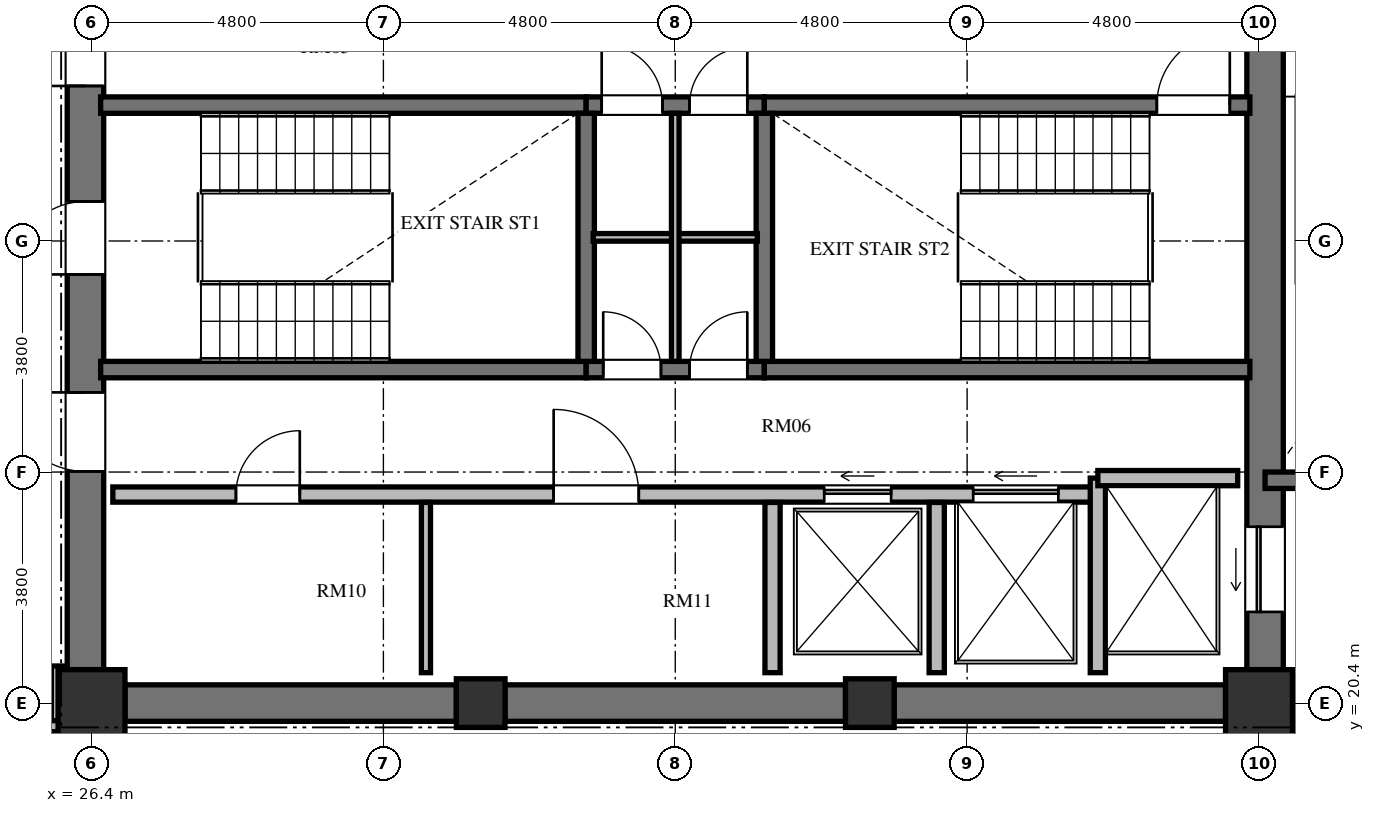
"""IFC4 building model, lengths in metres.
Left out: names, types, materials, properties, quantities, classifications, styles, units other than length and angle.
Written with IfcOpenShell. Run it as: python <this file> out.ifc"""

import sys

from ifc_helpers import new_model, si_unit, direction, frame, frame_2d, origin, origin_2d, place, context, subcontext, project, spatial, rectangle, extrude, element, fill, save


model = new_model("IFC4")
c1 = context("Model", 3, precision=1e-05, world=origin(), true_north=direction((0.0, 1.0)))
c2 = subcontext(c1, "Body", "Model", "MODEL_VIEW")
j1 = project(units=[si_unit("LENGTHUNIT", "METRE"), si_unit("PLANEANGLEUNIT", "RADIAN")], contexts=[c1])
p1 = place(None, origin())
s1 = spatial("IfcSite", under=j1, at=p1, CompositionType="ELEMENT")
p2 = place(p1, origin())
s2 = spatial("IfcBuilding", under=s1, at=p2, CompositionType="ELEMENT")
p3 = place(p2, frame((0.0, 0.0, 213.072)))
s3 = spatial("IfcBuildingStorey", under=s2, at=p3, CompositionType="ELEMENT", Elevation=213.072)
p4 = place(p3, frame((26.4, 20.4, 0.0), z_axis=(0.0, 0.0, 1.0), x_axis=(1.0, 0.0, 0.0)))
e1 = element("IfcColumn", 1, at=p4, inside=s3, PredefinedType="COLUMN", context=c2, shape_type="SweptSolid", body=[
    extrude(rectangle(XDim=1.1, YDim=1.1, at=origin_2d()), origin(), (0.0, 0.0, 1.0), 3.648),
])
for number, where, z_axis, x_axis in (
    (2, (32.8, 20.4, 0.0), (0.0, 0.0, 1.0), (1.0, 0.0, 0.0)),
    (3, (39.2, 20.4, 0.0), (0.0, 0.0, 1.0), (1.0, 0.0, 0.0)),
):
    element("IfcColumn", number, at=place(p3, frame(where, z_axis=z_axis, x_axis=x_axis)), inside=s3, PredefinedType="COLUMN", context=c2, shape_type="SweptSolid", body=[
        extrude(rectangle(XDim=0.8, YDim=0.8, at=origin_2d()), origin(), (0.0, 0.0, 1.0), 3.648),
    ])
p5 = place(p3, frame((45.6, 20.4, 0.0), z_axis=(0.0, 0.0, 1.0), x_axis=(1.0, 0.0, 0.0)))
e4 = element("IfcColumn", 4, at=p5, inside=s3, PredefinedType="COLUMN", context=c2, shape_type="SweptSolid", body=[
    extrude(rectangle(XDim=1.1, YDim=1.1, at=origin_2d()), origin(), (0.0, 0.0, 1.0), 3.648),
])
p6 = place(p3, frame((26.3, 20.95, 0.0), z_axis=(0.0, 0.0, 1.0), x_axis=(0.0, 1.0, 0.0)))
e5 = element("IfcWall", 5, at=p6, inside=s3, PredefinedType="SHEAR", context=c2, shape_type="SweptSolid", body=[
    extrude(rectangle(XDim=14.1, YDim=0.6, at=frame_2d((7.05, 0.0))), origin(), (0.0, 0.0, 1.0), 3.648),
])
p7 = place(p6, frame((6.5, 0.0, 0.0)))
e6 = element("IfcOpeningElement", 6, at=p7, cuts=e5, PredefinedType="OPENING", context=c2, shape_type="SweptSolid", body=[
    extrude(rectangle(XDim=1.2, YDim=2.15, at=frame_2d((0.6, 1.075))), frame((0.0, 0.31, 0.0), z_axis=(0.0, -1.0, 0.0), x_axis=(1.0, 0.0, 0.0)), (0.0, 0.0, 1.0), 0.62),
])
p8 = place(p6, frame((9.6, 0.0, 0.0)))
e7 = element("IfcOpeningElement", 7, at=p8, cuts=e5, PredefinedType="OPENING", context=c2, shape_type="SweptSolid", body=[
    extrude(rectangle(XDim=1.3, YDim=2.2, at=frame_2d((0.65, 1.1))), frame((0.0, 0.31, 0.0), z_axis=(0.0, -1.0, 0.0), x_axis=(1.0, 0.0, 0.0)), (0.0, 0.0, 1.0), 0.62),
])
p9 = place(p6, frame((3.26, 0.0, 0.0)))
e8 = element("IfcOpeningElement", 8, at=p9, cuts=e5, PredefinedType="OPENING", context=c2, shape_type="SweptSolid", body=[
    extrude(rectangle(XDim=1.3, YDim=2.2, at=frame_2d((0.65, 1.1))), frame((0.0, 0.31, 0.0), z_axis=(0.0, -1.0, 0.0), x_axis=(1.0, 0.0, 0.0)), (0.0, 0.0, 1.0), 0.62),
])
p10 = place(p3, frame((45.7, 20.95, 0.0), z_axis=(0.0, 0.0, 1.0), x_axis=(0.0, 1.0, 0.0)))
e9 = element("IfcWall", 9, at=p10, inside=s3, PredefinedType="SHEAR", context=c2, shape_type="SweptSolid", body=[
    extrude(rectangle(XDim=14.1, YDim=0.6, at=frame_2d((7.05, 0.0))), origin(), (0.0, 0.0, 1.0), 3.648),
])
p11 = place(p10, frame((11.75, 0.0, 0.0)))
e10 = element("IfcOpeningElement", 10, at=p11, cuts=e9, PredefinedType="OPENING", context=c2, shape_type="SweptSolid", body=[
    extrude(rectangle(XDim=1.4, YDim=2.3, at=frame_2d((0.7, 1.15))), frame((0.0, 0.31, 0.0), z_axis=(0.0, -1.0, 0.0), x_axis=(1.0, 0.0, 0.0)), (0.0, 0.0, 1.0), 0.62),
])
p12 = place(p10, frame((0.95, 0.0, 0.0)))
e11 = element("IfcOpeningElement", 11, at=p12, cuts=e9, PredefinedType="OPENING", context=c2, shape_type="SweptSolid", body=[
    extrude(rectangle(XDim=1.4, YDim=2.3, at=frame_2d((0.7, 1.15))), frame((0.0, 0.31, 0.0), z_axis=(0.0, -1.0, 0.0), x_axis=(1.0, 0.0, 0.0)), (0.0, 0.0, 1.0), 0.62),
])
p13 = place(p3, frame((26.95, 20.4, 0.0), z_axis=(0.0, 0.0, 1.0), x_axis=(1.0, 0.0, 0.0)))
e12 = element("IfcWall", 12, at=p13, inside=s3, PredefinedType="SHEAR", context=c2, shape_type="SweptSolid", body=[
    extrude(rectangle(XDim=5.45, YDim=0.6, at=frame_2d((2.725, 0.0))), origin(), (0.0, 0.0, 1.0), 3.648),
])
p14 = place(p3, frame((33.2, 20.4, 0.0), z_axis=(0.0, 0.0, 1.0), x_axis=(1.0, 0.0, 0.0)))
e13 = element("IfcWall", 13, at=p14, inside=s3, PredefinedType="SHEAR", context=c2, shape_type="SweptSolid", body=[
    extrude(rectangle(XDim=5.6, YDim=0.6, at=frame_2d((2.8, 0.0))), origin(), (0.0, 0.0, 1.0), 3.648),
])
p15 = place(p3, frame((39.6, 20.4, 0.0), z_axis=(0.0, 0.0, 1.0), x_axis=(1.0, 0.0, 0.0)))
e14 = element("IfcWall", 14, at=p15, inside=s3, PredefinedType="SHEAR", context=c2, shape_type="SweptSolid", body=[
    extrude(rectangle(XDim=5.45, YDim=0.6, at=frame_2d((2.725, 0.0))), origin(), (0.0, 0.0, 1.0), 3.648),
])
p16 = place(p3, frame((26.55, 30.235, 0.0), z_axis=(0.0, 0.0, 1.0), x_axis=(1.0, 0.0, 0.0)))
e15 = element("IfcWall", 15, at=p16, inside=s3, PredefinedType="SHEAR", context=c2, shape_type="SweptSolid", body=[
    extrude(rectangle(XDim=7.985, YDim=0.27, at=frame_2d((3.992, 0.0))), origin(), (0.0, 0.0, 1.0), 3.648),
])
p17 = place(p3, frame((34.535, 30.235, 0.0), z_axis=(0.0, 0.0, 1.0), x_axis=(1.0, 0.0, 0.0)))
e16 = element("IfcWall", 16, at=p17, inside=s3, PredefinedType="SHEAR", context=c2, shape_type="SweptSolid", body=[
    extrude(rectangle(XDim=2.93, YDim=0.27, at=frame_2d((1.465, 0.0))), origin(), (0.0, 0.0, 1.0), 3.648),
])
p18 = place(p17, frame((0.255, 0.0, 0.0)))
e17 = element("IfcOpeningElement", 17, at=p18, cuts=e16, PredefinedType="OPENING", context=c2, shape_type="SweptSolid", body=[
    extrude(rectangle(XDim=1.0, YDim=2.1, at=frame_2d((0.5, 1.05))), frame((0.0, 0.145, 0.0), z_axis=(0.0, -1.0, 0.0), x_axis=(1.0, 0.0, 0.0)), (0.0, 0.0, 1.0), 0.29),
])
p19 = place(p17, frame((1.7, 0.0, 0.0)))
e18 = element("IfcOpeningElement", 18, at=p19, cuts=e16, PredefinedType="OPENING", context=c2, shape_type="SweptSolid", body=[
    extrude(rectangle(XDim=0.95, YDim=2.1, at=frame_2d((0.475, 1.05))), frame((0.0, 0.145, 0.0), z_axis=(0.0, -1.0, 0.0), x_axis=(1.0, 0.0, 0.0)), (0.0, 0.0, 1.0), 0.29),
])
p20 = place(p3, frame((37.465, 30.235, 0.0), z_axis=(0.0, 0.0, 1.0), x_axis=(1.0, 0.0, 0.0)))
e19 = element("IfcWall", 19, at=p20, inside=s3, PredefinedType="SHEAR", context=c2, shape_type="SweptSolid", body=[
    extrude(rectangle(XDim=7.985, YDim=0.27, at=frame_2d((3.992, 0.0))), origin(), (0.0, 0.0, 1.0), 3.648),
])
p21 = place(p20, frame((6.455, 0.0, 0.0)))
e20 = element("IfcOpeningElement", 20, at=p21, cuts=e19, PredefinedType="OPENING", context=c2, shape_type="SweptSolid", body=[
    extrude(rectangle(XDim=1.2, YDim=2.15, at=frame_2d((0.6, 1.075))), frame((0.0, 0.145, 0.0), z_axis=(0.0, -1.0, 0.0), x_axis=(1.0, 0.0, 0.0)), (0.0, 0.0, 1.0), 0.29),
])
p22 = place(p3, frame((26.55, 25.885, 0.0), z_axis=(0.0, 0.0, 1.0), x_axis=(1.0, 0.0, 0.0)))
e21 = element("IfcWall", 21, at=p22, inside=s3, PredefinedType="SHEAR", context=c2, shape_type="SweptSolid", body=[
    extrude(rectangle(XDim=7.985, YDim=0.27, at=frame_2d((3.992, 0.0))), origin(), (0.0, 0.0, 1.0), 3.648),
])
p23 = place(p3, frame((34.535, 25.885, 0.0), z_axis=(0.0, 0.0, 1.0), x_axis=(1.0, 0.0, 0.0)))
e22 = element("IfcWall", 22, at=p23, inside=s3, PredefinedType="SHEAR", context=c2, shape_type="SweptSolid", body=[
    extrude(rectangle(XDim=2.93, YDim=0.27, at=frame_2d((1.465, 0.0))), origin(), (0.0, 0.0, 1.0), 3.648),
])
p24 = place(p23, frame((0.28, 0.0, 0.0)))
e23 = element("IfcOpeningElement", 23, at=p24, cuts=e22, PredefinedType="OPENING", context=c2, shape_type="SweptSolid", body=[
    extrude(rectangle(XDim=0.95, YDim=2.1, at=frame_2d((0.475, 1.05))), frame((0.0, 0.145, 0.0), z_axis=(0.0, -1.0, 0.0), x_axis=(1.0, 0.0, 0.0)), (0.0, 0.0, 1.0), 0.29),
])
p25 = place(p23, frame((1.7, 0.0, 0.0)))
e24 = element("IfcOpeningElement", 24, at=p25, cuts=e22, PredefinedType="OPENING", context=c2, shape_type="SweptSolid", body=[
    extrude(rectangle(XDim=0.95, YDim=2.1, at=frame_2d((0.475, 1.05))), frame((0.0, 0.145, 0.0), z_axis=(0.0, -1.0, 0.0), x_axis=(1.0, 0.0, 0.0)), (0.0, 0.0, 1.0), 0.29),
])
p26 = place(p3, frame((37.465, 25.885, 0.0), z_axis=(0.0, 0.0, 1.0), x_axis=(1.0, 0.0, 0.0)))
e25 = element("IfcWall", 25, at=p26, inside=s3, PredefinedType="SHEAR", context=c2, shape_type="SweptSolid", body=[
    extrude(rectangle(XDim=7.985, YDim=0.27, at=frame_2d((3.992, 0.0))), origin(), (0.0, 0.0, 1.0), 3.648),
])
for number, where, z_axis, x_axis in (
    (26, (34.535, 26.02, 0.0), (0.0, 0.0, 1.0), (0.0, 1.0, 0.0)),
    (27, (37.465, 26.02, 0.0), (0.0, 0.0, 1.0), (0.0, 1.0, 0.0)),
):
    element("IfcWall", number, at=place(p3, frame(where, z_axis=z_axis, x_axis=x_axis)), inside=s3, PredefinedType="SHEAR", context=c2, shape_type="SweptSolid", body=[
        extrude(rectangle(XDim=4.08, YDim=0.27, at=frame_2d((2.04, 0.0))), origin(), (0.0, 0.0, 1.0), 3.648),
    ])
p27 = place(p3, frame((34.65, 28.06, 0.0), z_axis=(0.0, 0.0, 1.0), x_axis=(1.0, 0.0, 0.0)))
e28 = element("IfcWall", 28, at=p27, inside=s3, PredefinedType="PARTITIONING", context=c2, shape_type="SweptSolid", body=[
    extrude(rectangle(XDim=2.7, YDim=0.125, at=frame_2d((1.35, 0.0))), origin(), (0.0, 0.0, 1.0), 3.448),
])
p28 = place(p3, frame((36.0, 26.02, 0.0), z_axis=(0.0, 0.0, 1.0), x_axis=(0.0, 1.0, 0.0)))
e29 = element("IfcWall", 29, at=p28, inside=s3, PredefinedType="PARTITIONING", context=c2, shape_type="SweptSolid", body=[
    extrude(rectangle(XDim=4.08, YDim=0.125, at=frame_2d((2.04, 0.0))), origin(), (0.0, 0.0, 1.0), 3.448),
])
p29 = place(p3, frame((26.75, 23.83, 0.0), z_axis=(0.0, 0.0, 1.0), x_axis=(1.0, 0.0, 0.0)))
e30 = element("IfcWall", 30, at=p29, inside=s3, PredefinedType="SOLIDWALL", context=c2, shape_type="SweptSolid", body=[
    extrude(rectangle(XDim=16.2, YDim=0.25, at=frame_2d((8.1, 0.0))), origin(), (0.0, 0.0, 1.0), 3.448),
])
p30 = place(p29, frame((2.025, 0.0, 0.0)))
e31 = element("IfcOpeningElement", 31, at=p30, cuts=e30, PredefinedType="OPENING", context=c2, shape_type="SweptSolid", body=[
    extrude(rectangle(XDim=1.05, YDim=2.15, at=frame_2d((0.525, 1.075))), frame((0.0, 0.135, 0.0), z_axis=(0.0, -1.0, 0.0), x_axis=(1.0, 0.0, 0.0)), (0.0, 0.0, 1.0), 0.27),
])
p31 = place(p29, frame((7.25, 0.0, 0.0)))
e32 = element("IfcOpeningElement", 32, at=p31, cuts=e30, PredefinedType="OPENING", context=c2, shape_type="SweptSolid", body=[
    extrude(rectangle(XDim=1.4, YDim=2.2, at=frame_2d((0.7, 1.1))), frame((0.0, 0.135, 0.0), z_axis=(0.0, -1.0, 0.0), x_axis=(1.0, 0.0, 0.0)), (0.0, 0.0, 1.0), 0.27),
])
p32 = place(p29, frame((11.7, 0.0, 0.0)))
e33 = element("IfcOpeningElement", 33, at=p32, cuts=e30, PredefinedType="OPENING", context=c2, shape_type="SweptSolid", body=[
    extrude(rectangle(XDim=1.1, YDim=2.2, at=frame_2d((0.55, 1.1))), frame((0.0, 0.135, 0.0), z_axis=(0.0, -1.0, 0.0), x_axis=(1.0, 0.0, 0.0)), (0.0, 0.0, 1.0), 0.27),
])
p33 = place(p29, frame((14.15, 0.0, 0.0)))
e34 = element("IfcOpeningElement", 34, at=p33, cuts=e30, PredefinedType="OPENING", context=c2, shape_type="SweptSolid", body=[
    extrude(rectangle(XDim=1.4, YDim=2.3, at=frame_2d((0.7, 1.15))), frame((0.0, 0.135, 0.0), z_axis=(0.0, -1.0, 0.0), x_axis=(1.0, 0.0, 0.0)), (0.0, 0.0, 1.0), 0.27),
])
p34 = place(p3, frame((42.95, 20.9, 0.0), z_axis=(0.0, 0.0, 1.0), x_axis=(0.0, 1.0, 0.0)))
e35 = element("IfcWall", 35, at=p34, inside=s3, PredefinedType="SOLIDWALL", context=c2, shape_type="SweptSolid", body=[
    extrude(rectangle(XDim=3.2, YDim=0.25, at=frame_2d((1.6, 0.0))), origin(), (0.0, 0.0, 1.0), 3.448),
])
p35 = place(p3, frame((42.95, 24.1, 0.0), z_axis=(0.0, 0.0, 1.0), x_axis=(1.0, 0.0, 0.0)))
e36 = element("IfcWall", 36, at=p35, inside=s3, PredefinedType="SOLIDWALL", context=c2, shape_type="SweptSolid", body=[
    extrude(rectangle(XDim=2.3, YDim=0.25, at=frame_2d((1.15, 0.0))), origin(), (0.0, 0.0, 1.0), 3.448),
])
for number, where, z_axis, x_axis in (
    (37, (37.6, 20.9, 0.0), (0.0, 0.0, 1.0), (0.0, 1.0, 0.0)),
    (38, (40.3, 20.9, 0.0), (0.0, 0.0, 1.0), (0.0, 1.0, 0.0)),
):
    element("IfcWall", number, at=place(p3, frame(where, z_axis=z_axis, x_axis=x_axis)), inside=s3, PredefinedType="SOLIDWALL", context=c2, shape_type="SweptSolid", body=[
        extrude(rectangle(XDim=2.8, YDim=0.25, at=frame_2d((1.4, 0.0))), origin(), (0.0, 0.0, 1.0), 3.448),
    ])
p36 = place(p3, frame((31.9, 20.9, 0.0), z_axis=(0.0, 0.0, 1.0), x_axis=(0.0, 1.0, 0.0)))
e39 = element("IfcWall", 39, at=p36, inside=s3, PredefinedType="PARTITIONING", context=c2, shape_type="SweptSolid", body=[
    extrude(rectangle(XDim=2.8, YDim=0.15, at=frame_2d((1.4, 0.0))), origin(), (0.0, 0.0, 1.0), 3.448),
])
p37 = place(p3, frame((45.7, 24.065, 0.0), z_axis=(0.0, 0.0, 1.0), x_axis=(1.0, 0.0, 0.0)))
e40 = element("IfcWall", 40, at=p37, inside=s3, PredefinedType="SHEAR", context=c2, shape_type="SweptSolid", body=[
    extrude(rectangle(XDim=4.715, YDim=0.27, at=frame_2d((2.357, 0.0))), origin(), (0.0, 0.0, 1.0), 3.648),
])
p38 = place(p3, frame((45.7, 20.02, 0.0), z_axis=(0.0, 0.0, 1.0), x_axis=(1.0, 0.0, 0.0)))
e41 = element("IfcWall", 41, at=p38, inside=s3, PredefinedType="SOLIDWALL", context=c2, shape_type="SweptSolid", body=[
    extrude(rectangle(XDim=4.715, YDim=0.25, at=frame_2d((2.357, 0.0))), origin(), (0.0, 0.0, 1.0), 3.448),
])
p39 = place(p3, frame((25.83, 21.01, 0.0), z_axis=(0.0, 0.0, 1.0), x_axis=(0.0, -1.0, 0.0)))
e42 = element("IfcWall", 42, at=p39, inside=s3, PredefinedType="PARTITIONING", context=c2, shape_type="SweptSolid", body=[
    extrude(rectangle(XDim=1.03, YDim=0.18, at=frame_2d((0.515, 0.0))), origin(), (0.0, 0.0, 1.0), 3.448),
])
p40 = place(p3, frame((25.87, 20.02, 0.0), z_axis=(0.0, 0.0, 1.0), x_axis=(-1.0, 0.0, 0.0)))
e43 = element("IfcWall", 43, at=p40, inside=s3, PredefinedType="PARTITIONING", context=c2, shape_type="SweptSolid", body=[
    extrude(rectangle(XDim=2.56, YDim=0.18, at=frame_2d((1.28, 0.0))), origin(), (0.0, 0.0, 1.0), 3.448),
])
p41 = place(p7, origin())
e44 = element("IfcDoor", 44, at=p41, inside=s3, OperationType="SINGLE_SWING_LEFT", PredefinedType="DOOR", context=c2, shape_type="SweptSolid", body=[
    extrude(rectangle(XDim=1.2, YDim=2.15, at=frame_2d((0.6, 1.075))), frame((0.0, 0.025, 0.0), z_axis=(0.0, -1.0, 0.0), x_axis=(1.0, 0.0, 0.0)), (0.0, 0.0, 1.0), 0.05),
])
fill(e6, e44)
p42 = place(p21, origin())
e45 = element("IfcDoor", 45, at=p42, inside=s3, OperationType="SINGLE_SWING_RIGHT", PredefinedType="DOOR", context=c2, shape_type="SweptSolid", body=[
    extrude(rectangle(XDim=1.2, YDim=2.15, at=frame_2d((0.6, 1.075))), frame((0.0, 0.025, 0.0), z_axis=(0.0, -1.0, 0.0), x_axis=(1.0, 0.0, 0.0)), (0.0, 0.0, 1.0), 0.05),
])
fill(e20, e45)
p43 = place(p24, origin())
e46 = element("IfcDoor", 46, at=p43, inside=s3, OperationType="SINGLE_SWING_LEFT", PredefinedType="DOOR", context=c2, shape_type="SweptSolid", body=[
    extrude(rectangle(XDim=0.95, YDim=2.1, at=frame_2d((0.475, 1.05))), frame((0.0, 0.025, 0.0), z_axis=(0.0, -1.0, 0.0), x_axis=(1.0, 0.0, 0.0)), (0.0, 0.0, 1.0), 0.05),
])
fill(e23, e46)
p44 = place(p25, origin())
e47 = element("IfcDoor", 47, at=p44, inside=s3, OperationType="SINGLE_SWING_RIGHT", PredefinedType="DOOR", context=c2, shape_type="SweptSolid", body=[
    extrude(rectangle(XDim=0.95, YDim=2.1, at=frame_2d((0.475, 1.05))), frame((0.0, 0.025, 0.0), z_axis=(0.0, -1.0, 0.0), x_axis=(1.0, 0.0, 0.0)), (0.0, 0.0, 1.0), 0.05),
])
fill(e24, e47)
p45 = place(p18, origin())
e48 = element("IfcDoor", 48, at=p45, inside=s3, OperationType="SINGLE_SWING_LEFT", PredefinedType="DOOR", context=c2, shape_type="SweptSolid", body=[
    extrude(rectangle(XDim=1.0, YDim=2.1, at=frame_2d((0.5, 1.05))), frame((0.0, 0.025, 0.0), z_axis=(0.0, -1.0, 0.0), x_axis=(1.0, 0.0, 0.0)), (0.0, 0.0, 1.0), 0.05),
])
fill(e17, e48)
p46 = place(p19, origin())
e49 = element("IfcDoor", 49, at=p46, inside=s3, OperationType="SINGLE_SWING_RIGHT", PredefinedType="DOOR", context=c2, shape_type="SweptSolid", body=[
    extrude(rectangle(XDim=0.95, YDim=2.1, at=frame_2d((0.475, 1.05))), frame((0.0, 0.025, 0.0), z_axis=(0.0, -1.0, 0.0), x_axis=(1.0, 0.0, 0.0)), (0.0, 0.0, 1.0), 0.05),
])
fill(e18, e49)
p47 = place(p8, origin())
e50 = element("IfcDoor", 50, at=p47, inside=s3, OperationType="SINGLE_SWING_LEFT", PredefinedType="DOOR", context=c2, shape_type="SweptSolid", body=[
    extrude(rectangle(XDim=1.3, YDim=2.2, at=frame_2d((0.65, 1.1))), frame((0.0, 0.025, 0.0), z_axis=(0.0, -1.0, 0.0), x_axis=(1.0, 0.0, 0.0)), (0.0, 0.0, 1.0), 0.05),
])
fill(e7, e50)
p48 = place(p9, origin())
e51 = element("IfcDoor", 51, at=p48, inside=s3, OperationType="SINGLE_SWING_RIGHT", PredefinedType="DOOR", context=c2, shape_type="SweptSolid", body=[
    extrude(rectangle(XDim=1.3, YDim=2.2, at=frame_2d((0.65, 1.1))), frame((0.0, 0.025, 0.0), z_axis=(0.0, -1.0, 0.0), x_axis=(1.0, 0.0, 0.0)), (0.0, 0.0, 1.0), 0.05),
])
fill(e8, e51)
p49 = place(p30, origin())
e52 = element("IfcDoor", 52, at=p49, inside=s3, OperationType="SINGLE_SWING_RIGHT", PredefinedType="DOOR", context=c2, shape_type="SweptSolid", body=[
    extrude(rectangle(XDim=1.05, YDim=2.15, at=frame_2d((0.525, 1.075))), frame((0.0, 0.025, 0.0), z_axis=(0.0, -1.0, 0.0), x_axis=(1.0, 0.0, 0.0)), (0.0, 0.0, 1.0), 0.05),
])
fill(e31, e52)
p50 = place(p31, origin())
e53 = element("IfcDoor", 53, at=p50, inside=s3, OperationType="SINGLE_SWING_LEFT", PredefinedType="DOOR", context=c2, shape_type="SweptSolid", body=[
    extrude(rectangle(XDim=1.4, YDim=2.2, at=frame_2d((0.7, 1.1))), frame((0.0, 0.025, 0.0), z_axis=(0.0, -1.0, 0.0), x_axis=(1.0, 0.0, 0.0)), (0.0, 0.0, 1.0), 0.05),
])
fill(e32, e53)
p51 = place(p32, origin())
e54 = element("IfcDoor", 54, at=p51, inside=s3, OperationType="SLIDING_TO_LEFT", PredefinedType="DOOR", context=c2, shape_type="SweptSolid", body=[
    extrude(rectangle(XDim=1.1, YDim=2.2, at=frame_2d((0.55, 1.1))), frame((0.0, 0.025, 0.0), z_axis=(0.0, -1.0, 0.0), x_axis=(1.0, 0.0, 0.0)), (0.0, 0.0, 1.0), 0.05),
])
fill(e33, e54)
p52 = place(p12, origin())
e55 = element("IfcDoor", 55, at=p52, inside=s3, OperationType="SLIDING_TO_LEFT", PredefinedType="DOOR", context=c2, shape_type="SweptSolid", body=[
    extrude(rectangle(XDim=1.4, YDim=2.3, at=frame_2d((0.7, 1.15))), frame((0.0, 0.025, 0.0), z_axis=(0.0, -1.0, 0.0), x_axis=(1.0, 0.0, 0.0)), (0.0, 0.0, 1.0), 0.05),
])
fill(e11, e55)
p53 = place(p33, origin())
e56 = element("IfcDoor", 56, at=p53, inside=s3, OperationType="SLIDING_TO_LEFT", PredefinedType="DOOR", context=c2, shape_type="SweptSolid", body=[
    extrude(rectangle(XDim=1.4, YDim=2.3, at=frame_2d((0.7, 1.15))), frame((0.0, 0.025, 0.0), z_axis=(0.0, -1.0, 0.0), x_axis=(1.0, 0.0, 0.0)), (0.0, 0.0, 1.0), 0.05),
])
fill(e34, e56)
save(model, sys.argv[1])
